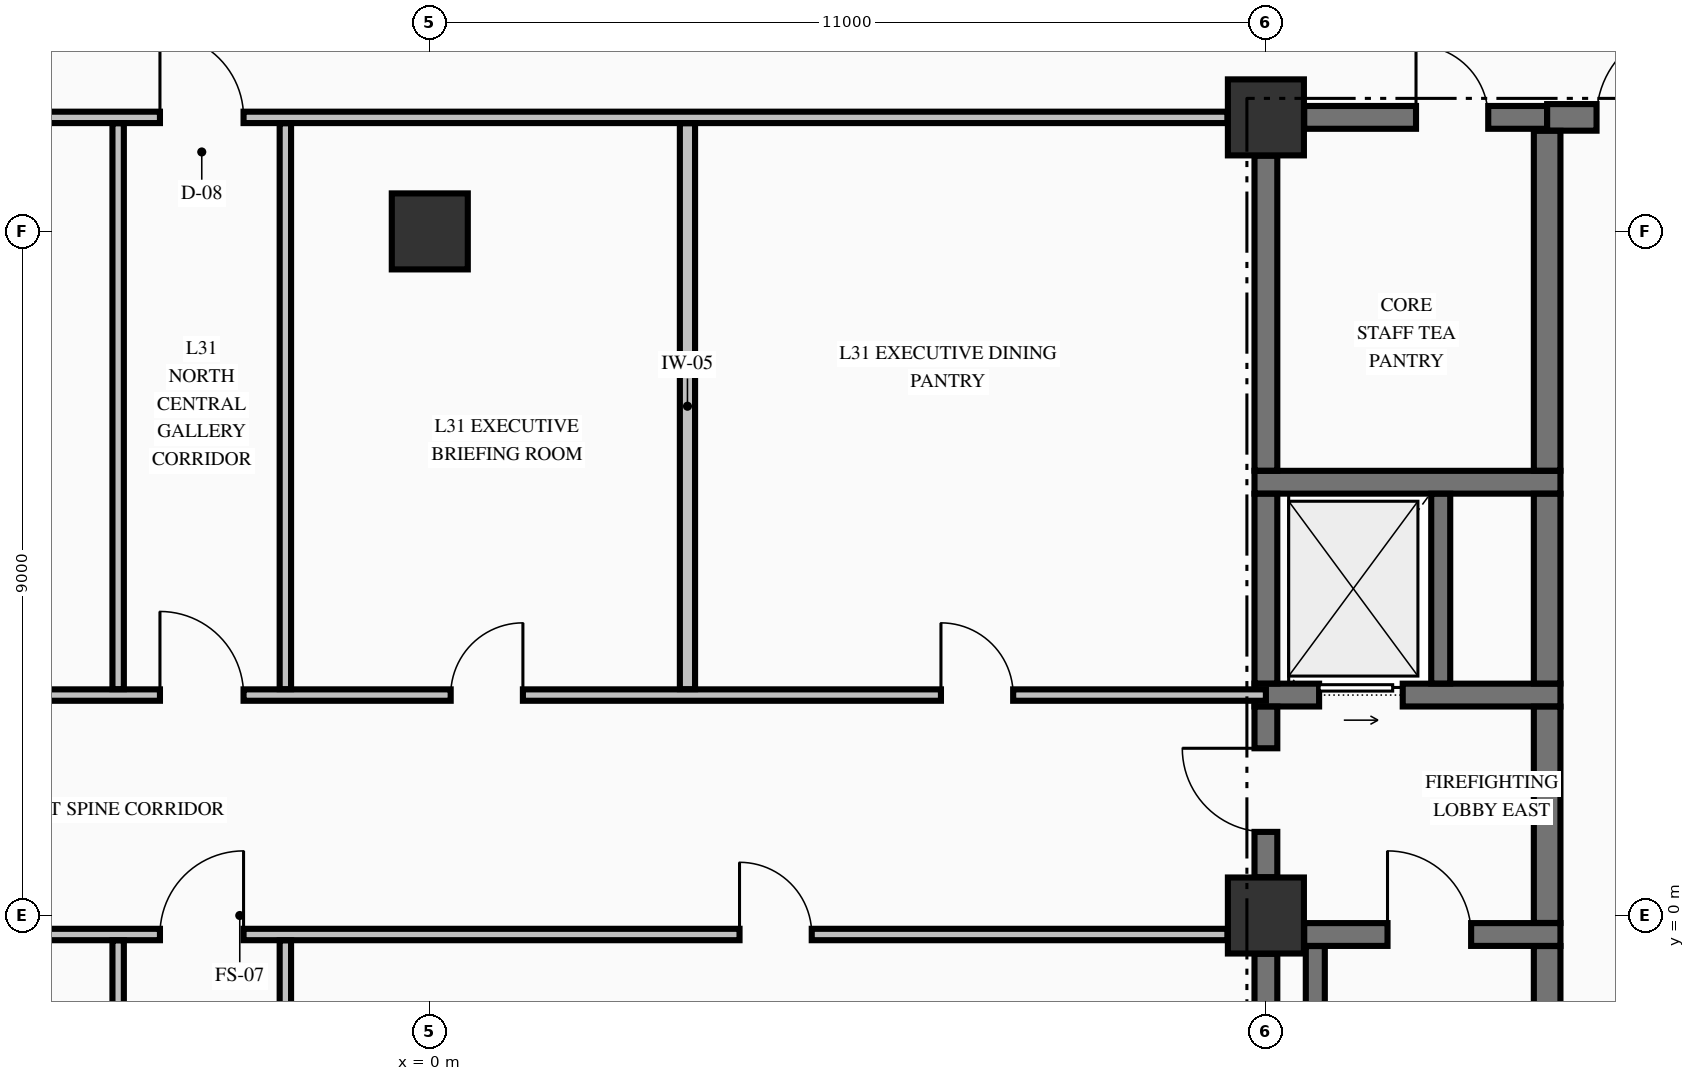
"""IFC4 building model, lengths in metres.
Left out: names, types, materials, properties, quantities, classifications, styles, units other than length and angle.
Written with IfcOpenShell. Run it as: python <this file> out.ifc"""

import sys

from ifc_helpers import new_model, si_unit, direction, frame, frame_2d, origin, origin_2d, place, context, subcontext, project, spatial, rectangle, extrude, element, fill, save


model = new_model("IFC4")
c1 = context("Model", 3, precision=1e-05, world=origin(), true_north=direction((0.0, 1.0)))
c2 = subcontext(c1, "Body", "Model", "MODEL_VIEW")
j1 = project(units=[si_unit("LENGTHUNIT", "METRE"), si_unit("PLANEANGLEUNIT", "RADIAN")], contexts=[c1])
p1 = place(None, origin())
s1 = spatial("IfcSite", under=j1, at=p1, CompositionType="ELEMENT")
p2 = place(p1, origin())
s2 = spatial("IfcBuilding", under=s1, at=p2, CompositionType="ELEMENT")
p3 = place(p2, frame((0.0, 0.0, 124.92)))
s3 = spatial("IfcBuildingStorey", under=s2, at=p3, CompositionType="ELEMENT", Elevation=124.92)
for number, where, z_axis, x_axis in (
    (1, (11.0, 0.0, -0.25), (0.0, 0.0, 1.0), (1.0, 0.0, 0.0)),
    (2, (11.0, 10.5, -0.25), (0.0, 0.0, 1.0), (1.0, 0.0, 0.0)),
    (3, (0.0, 9.0, -0.25), (0.0, 0.0, 1.0), (1.0, 0.0, 0.0)),
):
    element("IfcColumn", number, at=place(p3, frame(where, z_axis=z_axis, x_axis=x_axis)), inside=s3, PredefinedType="COLUMN", context=c2, shape_type="SweptSolid", body=[
        extrude(rectangle(XDim=1.0, YDim=1.0, at=origin_2d()), origin(), (0.0, 0.0, 1.0), 3.57),
    ])
p4 = place(p3, frame((11.504, -0.25, 0.0), z_axis=(0.0, 0.0, 1.0), x_axis=(1.0, 0.0, 0.0)))
e4 = element("IfcWall", 4, at=p4, inside=s3, PredefinedType="SHEAR", context=c2, shape_type="SweptSolid", body=[
    extrude(rectangle(XDim=3.371, YDim=0.3, at=frame_2d((1.686, 0.0))), origin(), (0.0, 0.0, 1.0), 3.32),
])
p5 = place(p4, frame((1.096, 0.0, 0.0)))
e5 = element("IfcOpeningElement", 5, at=p5, cuts=e4, PredefinedType="OPENING", context=c2, shape_type="SweptSolid", body=[
    extrude(rectangle(XDim=1.1, YDim=2.15, at=frame_2d((0.55, 1.075))), frame((0.0, 0.16, 0.0), z_axis=(0.0, -1.0, 0.0), x_axis=(1.0, 0.0, 0.0)), (0.0, 0.0, 1.0), 0.32),
])
p6 = place(p3, frame((10.85, 2.9, 0.0), z_axis=(0.0, 0.0, 1.0), x_axis=(1.0, 0.0, 0.0)))
e6 = element("IfcWall", 6, at=p6, inside=s3, PredefinedType="SHEAR", context=c2, shape_type="SweptSolid", body=[
    extrude(rectangle(XDim=4.025, YDim=0.3, at=frame_2d((2.012, 0.0))), origin(), (0.0, 0.0, 1.0), 3.32),
])
p7 = place(p6, frame((0.85, 0.0, 0.0)))
e7 = element("IfcOpeningElement", 7, at=p7, cuts=e6, PredefinedType="OPENING", context=c2, shape_type="SweptSolid", body=[
    extrude(rectangle(XDim=1.1, YDim=2.2, at=frame_2d((0.55, 1.1))), frame((0.0, 0.16, 0.0), z_axis=(0.0, -1.0, 0.0), x_axis=(1.0, 0.0, 0.0)), (0.0, 0.0, 1.0), 0.32),
])
p8 = place(p3, frame((10.85, 5.7, 0.0), z_axis=(0.0, 0.0, 1.0), x_axis=(1.0, 0.0, 0.0)))
e8 = element("IfcWall", 8, at=p8, inside=s3, PredefinedType="SHEAR", context=c2, shape_type="SweptSolid", body=[
    extrude(rectangle(XDim=4.025, YDim=0.3, at=frame_2d((2.012, 0.0))), origin(), (0.0, 0.0, 1.0), 3.32),
])
p9 = place(p3, frame((11.504, 10.5, 0.0), z_axis=(0.0, 0.0, 1.0), x_axis=(1.0, 0.0, 0.0)))
e9 = element("IfcWall", 9, at=p9, inside=s3, PredefinedType="SHEAR", context=c2, shape_type="SweptSolid", body=[
    extrude(rectangle(XDim=3.196, YDim=0.3, at=frame_2d((1.598, 0.0))), origin(), (0.0, 0.0, 1.0), 3.32),
])
p10 = place(p9, frame((1.471, 0.0, 0.0)))
e10 = element("IfcOpeningElement", 10, at=p10, cuts=e9, PredefinedType="OPENING", context=c2, shape_type="SweptSolid", body=[
    extrude(rectangle(XDim=0.95, YDim=2.15, at=frame_2d((0.475, 1.075))), frame((0.0, 0.16, 0.0), z_axis=(0.0, -1.0, 0.0), x_axis=(1.0, 0.0, 0.0)), (0.0, 0.0, 1.0), 0.32),
])
p11 = place(p3, frame((14.7, 10.5, 0.0), z_axis=(0.0, 0.0, 1.0), x_axis=(1.0, 0.0, 0.0)))
e11 = element("IfcWall", 11, at=p11, inside=s3, PredefinedType="SHEAR", context=c2, shape_type="SweptSolid", body=[
    extrude(rectangle(XDim=4.796, YDim=0.35, at=frame_2d((2.398, 0.0))), origin(), (0.0, 0.0, 1.0), 3.32),
])
p12 = place(p11, frame((0.65, 0.0, 0.0)))
e12 = element("IfcOpeningElement", 12, at=p12, cuts=e11, PredefinedType="OPENING", context=c2, shape_type="SweptSolid", body=[
    extrude(rectangle(XDim=1.2, YDim=2.15, at=frame_2d((0.6, 1.075))), frame((0.0, 0.185, 0.0), z_axis=(0.0, -1.0, 0.0), x_axis=(1.0, 0.0, 0.0)), (0.0, 0.0, 1.0), 0.37),
])
p13 = place(p11, frame((3.225, 0.0, 0.0)))
e13 = element("IfcOpeningElement", 13, at=p13, cuts=e11, PredefinedType="OPENING", context=c2, shape_type="SweptSolid", body=[
    extrude(rectangle(XDim=0.95, YDim=2.15, at=frame_2d((0.475, 1.075))), frame((0.0, 0.185, 0.0), z_axis=(0.0, -1.0, 0.0), x_axis=(1.0, 0.0, 0.0)), (0.0, 0.0, 1.0), 0.37),
])
p14 = place(p3, frame((-10.494, -0.25, 0.0), z_axis=(0.0, 0.0, 1.0), x_axis=(1.0, 0.0, 0.0)))
e14 = element("IfcWall", 14, at=p14, inside=s3, PredefinedType="PARTITIONING", context=c2, shape_type="SweptSolid", body=[
    extrude(rectangle(XDim=20.988, YDim=0.15, at=frame_2d((10.494, 0.0))), origin(), (0.0, 0.0, 1.0), 3.32),
])
p15 = place(p14, frame((6.944, 0.0, 0.0)))
e15 = element("IfcOpeningElement", 15, at=p15, cuts=e14, PredefinedType="OPENING", context=c2, shape_type="SweptSolid", body=[
    extrude(rectangle(XDim=1.1, YDim=2.15, at=frame_2d((0.55, 1.075))), frame((0.0, 0.085, 0.0), z_axis=(0.0, -1.0, 0.0), x_axis=(1.0, 0.0, 0.0)), (0.0, 0.0, 1.0), 0.17),
])
p16 = place(p14, frame((2.419, 0.0, 0.0)))
e16 = element("IfcOpeningElement", 16, at=p16, cuts=e14, PredefinedType="OPENING", context=c2, shape_type="SweptSolid", body=[
    extrude(rectangle(XDim=1.05, YDim=2.15, at=frame_2d((0.525, 1.075))), frame((0.0, 0.085, 0.0), z_axis=(0.0, -1.0, 0.0), x_axis=(1.0, 0.0, 0.0)), (0.0, 0.0, 1.0), 0.17),
])
p17 = place(p14, frame((14.569, 0.0, 0.0)))
e17 = element("IfcOpeningElement", 17, at=p17, cuts=e14, PredefinedType="OPENING", context=c2, shape_type="SweptSolid", body=[
    extrude(rectangle(XDim=0.95, YDim=2.15, at=frame_2d((0.475, 1.075))), frame((0.0, 0.085, 0.0), z_axis=(0.0, -1.0, 0.0), x_axis=(1.0, 0.0, 0.0)), (0.0, 0.0, 1.0), 0.17),
])
p18 = place(p3, frame((-11.0, 2.9, 0.0), z_axis=(0.0, 0.0, 1.0), x_axis=(1.0, 0.0, 0.0)))
e18 = element("IfcWall", 18, at=p18, inside=s3, PredefinedType="PARTITIONING", context=c2, shape_type="SweptSolid", body=[
    extrude(rectangle(XDim=22.0, YDim=0.15, at=frame_2d((11.0, 0.0))), origin(), (0.0, 0.0, 1.0), 3.32),
])
p19 = place(p18, frame((7.45, 0.0, 0.0)))
e19 = element("IfcOpeningElement", 19, at=p19, cuts=e18, PredefinedType="OPENING", context=c2, shape_type="SweptSolid", body=[
    extrude(rectangle(XDim=1.1, YDim=2.15, at=frame_2d((0.55, 1.075))), frame((0.0, 0.085, 0.0), z_axis=(0.0, -1.0, 0.0), x_axis=(1.0, 0.0, 0.0)), (0.0, 0.0, 1.0), 0.17),
])
p20 = place(p18, frame((2.925, 0.0, 0.0)))
e20 = element("IfcOpeningElement", 20, at=p20, cuts=e18, PredefinedType="OPENING", context=c2, shape_type="SweptSolid", body=[
    extrude(rectangle(XDim=1.05, YDim=2.15, at=frame_2d((0.525, 1.075))), frame((0.0, 0.085, 0.0), z_axis=(0.0, -1.0, 0.0), x_axis=(1.0, 0.0, 0.0)), (0.0, 0.0, 1.0), 0.17),
])
p21 = place(p18, frame((11.275, 0.0, 0.0)))
e21 = element("IfcOpeningElement", 21, at=p21, cuts=e18, PredefinedType="OPENING", context=c2, shape_type="SweptSolid", body=[
    extrude(rectangle(XDim=0.95, YDim=2.15, at=frame_2d((0.475, 1.075))), frame((0.0, 0.085, 0.0), z_axis=(0.0, -1.0, 0.0), x_axis=(1.0, 0.0, 0.0)), (0.0, 0.0, 1.0), 0.17),
])
p22 = place(p18, frame((17.725, 0.0, 0.0)))
e22 = element("IfcOpeningElement", 22, at=p22, cuts=e18, PredefinedType="OPENING", context=c2, shape_type="SweptSolid", body=[
    extrude(rectangle(XDim=0.95, YDim=2.15, at=frame_2d((0.475, 1.075))), frame((0.0, 0.085, 0.0), z_axis=(0.0, -1.0, 0.0), x_axis=(1.0, 0.0, 0.0)), (0.0, 0.0, 1.0), 0.17),
])
p23 = place(p3, frame((-10.494, 10.5, 0.0), z_axis=(0.0, 0.0, 1.0), x_axis=(1.0, 0.0, 0.0)))
e23 = element("IfcWall", 23, at=p23, inside=s3, PredefinedType="PARTITIONING", context=c2, shape_type="SweptSolid", body=[
    extrude(rectangle(XDim=20.988, YDim=0.15, at=frame_2d((10.494, 0.0))), origin(), (0.0, 0.0, 1.0), 3.32),
])
p24 = place(p23, frame((6.944, 0.0, 0.0)))
e24 = element("IfcOpeningElement", 24, at=p24, cuts=e23, PredefinedType="OPENING", context=c2, shape_type="SweptSolid", body=[
    extrude(rectangle(XDim=1.1, YDim=2.15, at=frame_2d((0.55, 1.075))), frame((0.0, 0.085, 0.0), z_axis=(0.0, -1.0, 0.0), x_axis=(1.0, 0.0, 0.0)), (0.0, 0.0, 1.0), 0.17),
])
p25 = place(p3, frame((11.0, -9.446, 0.0), z_axis=(0.0, 0.0, 1.0), x_axis=(0.0, 1.0, 0.0)))
e25 = element("IfcWall", 25, at=p25, inside=s3, PredefinedType="SHEAR", context=c2, shape_type="SweptSolid", body=[
    extrude(rectangle(XDim=8.942, YDim=0.3, at=frame_2d((4.471, 0.0))), origin(), (0.0, 0.0, 1.0), 3.32),
])
p26 = place(p3, frame((11.0, 0.504, 0.0), z_axis=(0.0, 0.0, 1.0), x_axis=(0.0, 1.0, 0.0)))
e26 = element("IfcWall", 26, at=p26, inside=s3, PredefinedType="SHEAR", context=c2, shape_type="SweptSolid", body=[
    extrude(rectangle(XDim=2.244, YDim=0.3, at=frame_2d((1.122, 0.0))), origin(), (0.0, 0.0, 1.0), 3.32),
])
p27 = place(p26, frame((0.596, 0.0, 0.0)))
e27 = element("IfcOpeningElement", 27, at=p27, cuts=e26, PredefinedType="OPENING", context=c2, shape_type="SweptSolid", body=[
    extrude(rectangle(XDim=1.1, YDim=2.15, at=frame_2d((0.55, 1.075))), frame((0.0, 0.16, 0.0), z_axis=(0.0, -1.0, 0.0), x_axis=(1.0, 0.0, 0.0)), (0.0, 0.0, 1.0), 0.32),
])
p28 = place(p3, frame((11.0, 3.052, 0.0), z_axis=(0.0, 0.0, 1.0), x_axis=(0.0, 1.0, 0.0)))
e28 = element("IfcWall", 28, at=p28, inside=s3, PredefinedType="SHEAR", context=c2, shape_type="SweptSolid", body=[
    extrude(rectangle(XDim=2.496, YDim=0.3, at=frame_2d((1.248, 0.0))), origin(), (0.0, 0.0, 1.0), 3.32),
])
p29 = place(p3, frame((11.0, 5.852, 0.0), z_axis=(0.0, 0.0, 1.0), x_axis=(0.0, 1.0, 0.0)))
e29 = element("IfcWall", 29, at=p29, inside=s3, PredefinedType="SHEAR", context=c2, shape_type="SweptSolid", body=[
    extrude(rectangle(XDim=4.144, YDim=0.3, at=frame_2d((2.072, 0.0))), origin(), (0.0, 0.0, 1.0), 3.32),
])
p30 = place(p3, frame((11.65, -9.798, 0.0), z_axis=(0.0, 0.0, 1.0), x_axis=(0.0, 1.0, 0.0)))
e30 = element("IfcWall", 30, at=p30, inside=s3, PredefinedType="SOLIDWALL", context=c2, shape_type="SweptSolid", body=[
    extrude(rectangle(XDim=9.396, YDim=0.25, at=frame_2d((4.698, 0.0))), origin(), (0.0, 0.0, 1.0), 3.32),
])
p31 = place(p3, frame((13.3, 3.052, 0.0), z_axis=(0.0, 0.0, 1.0), x_axis=(0.0, 1.0, 0.0)))
e31 = element("IfcWall", 31, at=p31, inside=s3, PredefinedType="SOLIDWALL", context=c2, shape_type="SweptSolid", body=[
    extrude(rectangle(XDim=2.496, YDim=0.25, at=frame_2d((1.248, 0.0))), origin(), (0.0, 0.0, 1.0), 3.32),
])
p32 = place(p3, frame((14.7, -9.773, 0.0), z_axis=(0.0, 0.0, 1.0), x_axis=(0.0, 1.0, 0.0)))
e32 = element("IfcWall", 32, at=p32, inside=s3, PredefinedType="SHEAR", context=c2, shape_type="SweptSolid", body=[
    extrude(rectangle(XDim=9.371, YDim=0.35, at=frame_2d((4.686, 0.0))), origin(), (0.0, 0.0, 1.0), 3.32),
])
p33 = place(p3, frame((14.7, -0.098, 0.0), z_axis=(0.0, 0.0, 1.0), x_axis=(0.0, 1.0, 0.0)))
e33 = element("IfcWall", 33, at=p33, inside=s3, PredefinedType="SHEAR", context=c2, shape_type="SweptSolid", body=[
    extrude(rectangle(XDim=2.846, YDim=0.35, at=frame_2d((1.423, 0.0))), origin(), (0.0, 0.0, 1.0), 3.32),
])
p34 = place(p3, frame((14.7, 3.052, 0.0), z_axis=(0.0, 0.0, 1.0), x_axis=(0.0, 1.0, 0.0)))
e34 = element("IfcWall", 34, at=p34, inside=s3, PredefinedType="SHEAR", context=c2, shape_type="SweptSolid", body=[
    extrude(rectangle(XDim=2.496, YDim=0.35, at=frame_2d((1.248, 0.0))), origin(), (0.0, 0.0, 1.0), 3.32),
])
p35 = place(p3, frame((14.7, 5.852, 0.0), z_axis=(0.0, 0.0, 1.0), x_axis=(0.0, 1.0, 0.0)))
e35 = element("IfcWall", 35, at=p35, inside=s3, PredefinedType="SHEAR", context=c2, shape_type="SweptSolid", body=[
    extrude(rectangle(XDim=4.471, YDim=0.35, at=frame_2d((2.235, 0.0))), origin(), (0.0, 0.0, 1.0), 3.32),
])
p36 = place(p3, frame((-4.1, -9.872, 0.0), z_axis=(0.0, 0.0, 1.0), x_axis=(0.0, 1.0, 0.0)))
e36 = element("IfcWall", 36, at=p36, inside=s3, PredefinedType="PARTITIONING", context=c2, shape_type="SweptSolid", body=[
    extrude(rectangle(XDim=9.544, YDim=0.15, at=frame_2d((4.772, 0.0))), origin(), (0.0, 0.0, 1.0), 3.32),
])
p37 = place(p3, frame((-4.1, 2.978, 0.0), z_axis=(0.0, 0.0, 1.0), x_axis=(0.0, 1.0, 0.0)))
e37 = element("IfcWall", 37, at=p37, inside=s3, PredefinedType="PARTITIONING", context=c2, shape_type="SweptSolid", body=[
    extrude(rectangle(XDim=7.444, YDim=0.15, at=frame_2d((3.722, 0.0))), origin(), (0.0, 0.0, 1.0), 3.32),
])
p38 = place(p3, frame((-1.9, -4.747, 0.0), z_axis=(0.0, 0.0, 1.0), x_axis=(0.0, 1.0, 0.0)))
e38 = element("IfcWall", 38, at=p38, inside=s3, PredefinedType="PARTITIONING", context=c2, shape_type="SweptSolid", body=[
    extrude(rectangle(XDim=4.419, YDim=0.15, at=frame_2d((2.209, 0.0))), origin(), (0.0, 0.0, 1.0), 3.32),
])
p39 = place(p3, frame((-1.9, 2.978, 0.0), z_axis=(0.0, 0.0, 1.0), x_axis=(0.0, 1.0, 0.0)))
e39 = element("IfcWall", 39, at=p39, inside=s3, PredefinedType="PARTITIONING", context=c2, shape_type="SweptSolid", body=[
    extrude(rectangle(XDim=7.444, YDim=0.15, at=frame_2d((3.722, 0.0))), origin(), (0.0, 0.0, 1.0), 3.32),
])
p40 = place(p3, frame((3.39, 2.978, 0.0), z_axis=(0.0, 0.0, 1.0), x_axis=(0.0, 1.0, 0.0)))
e40 = element("IfcWall", 40, at=p40, inside=s3, PredefinedType="PARTITIONING", context=c2, shape_type="SweptSolid", body=[
    extrude(rectangle(XDim=7.444, YDim=0.2, at=frame_2d((3.722, 0.0))), origin(), (0.0, 0.0, 1.0), 3.32),
])
p41 = place(p5, origin())
e41 = element("IfcDoor", 41, at=p41, inside=s3, OperationType="SINGLE_SWING_LEFT", PredefinedType="DOOR", context=c2, shape_type="SweptSolid", body=[
    extrude(rectangle(XDim=1.1, YDim=2.15, at=frame_2d((0.55, 1.075))), frame((0.0, 0.025, 0.0), z_axis=(0.0, -1.0, 0.0), x_axis=(1.0, 0.0, 0.0)), (0.0, 0.0, 1.0), 0.05),
])
fill(e5, e41)
p42 = place(p27, origin())
e42 = element("IfcDoor", 42, at=p42, inside=s3, OperationType="SINGLE_SWING_RIGHT", PredefinedType="DOOR", context=c2, shape_type="SweptSolid", body=[
    extrude(rectangle(XDim=1.1, YDim=2.15, at=frame_2d((0.55, 1.075))), frame((0.0, 0.025, 0.0), z_axis=(0.0, -1.0, 0.0), x_axis=(1.0, 0.0, 0.0)), (0.0, 0.0, 1.0), 0.05),
])
fill(e27, e42)
p43 = place(p7, origin())
e43 = element("IfcDoor", 43, at=p43, inside=s3, OperationType="SLIDING_TO_RIGHT", PredefinedType="DOOR", context=c2, shape_type="SweptSolid", body=[
    extrude(rectangle(XDim=1.1, YDim=2.2, at=frame_2d((0.55, 1.1))), frame((0.0, 0.025, 0.0), z_axis=(0.0, -1.0, 0.0), x_axis=(1.0, 0.0, 0.0)), (0.0, 0.0, 1.0), 0.05),
])
fill(e7, e43)
p44 = place(p10, origin())
e44 = element("IfcDoor", 44, at=p44, inside=s3, OperationType="SINGLE_SWING_LEFT", PredefinedType="DOOR", context=c2, shape_type="SweptSolid", body=[
    extrude(rectangle(XDim=0.95, YDim=2.15, at=frame_2d((0.475, 1.075))), frame((0.0, 0.025, 0.0), z_axis=(0.0, -1.0, 0.0), x_axis=(1.0, 0.0, 0.0)), (0.0, 0.0, 1.0), 0.05),
])
fill(e10, e44)
p45 = place(p12, origin())
e45 = element("IfcDoor", 45, at=p45, inside=s3, OperationType="SINGLE_SWING_RIGHT", PredefinedType="DOOR", context=c2, shape_type="SweptSolid", body=[
    extrude(rectangle(XDim=1.2, YDim=2.15, at=frame_2d((0.6, 1.075))), frame((0.0, 0.025, 0.0), z_axis=(0.0, -1.0, 0.0), x_axis=(1.0, 0.0, 0.0)), (0.0, 0.0, 1.0), 0.05),
])
fill(e12, e45)
p46 = place(p24, origin())
e46 = element("IfcDoor", 46, at=p46, inside=s3, OperationType="SINGLE_SWING_LEFT", PredefinedType="DOOR", context=c2, shape_type="SweptSolid", body=[
    extrude(rectangle(XDim=1.1, YDim=2.15, at=frame_2d((0.55, 1.075))), frame((0.0, 0.025, 0.0), z_axis=(0.0, -1.0, 0.0), x_axis=(1.0, 0.0, 0.0)), (0.0, 0.0, 1.0), 0.05),
])
fill(e24, e46)
p47 = place(p19, origin())
e47 = element("IfcDoor", 47, at=p47, inside=s3, OperationType="SINGLE_SWING_LEFT", PredefinedType="DOOR", context=c2, shape_type="SweptSolid", body=[
    extrude(rectangle(XDim=1.1, YDim=2.15, at=frame_2d((0.55, 1.075))), frame((0.0, 0.025, 0.0), z_axis=(0.0, -1.0, 0.0), x_axis=(1.0, 0.0, 0.0)), (0.0, 0.0, 1.0), 0.05),
])
fill(e19, e47)
p48 = place(p15, origin())
e48 = element("IfcDoor", 48, at=p48, inside=s3, OperationType="SINGLE_SWING_RIGHT", PredefinedType="DOOR", context=c2, shape_type="SweptSolid", body=[
    extrude(rectangle(XDim=1.1, YDim=2.15, at=frame_2d((0.55, 1.075))), frame((0.0, 0.025, 0.0), z_axis=(0.0, -1.0, 0.0), x_axis=(1.0, 0.0, 0.0)), (0.0, 0.0, 1.0), 0.05),
])
fill(e15, e48)
p49 = place(p21, origin())
e49 = element("IfcDoor", 49, at=p49, inside=s3, OperationType="SINGLE_SWING_RIGHT", PredefinedType="DOOR", context=c2, shape_type="SweptSolid", body=[
    extrude(rectangle(XDim=0.95, YDim=2.15, at=frame_2d((0.475, 1.075))), frame((0.0, 0.025, 0.0), z_axis=(0.0, -1.0, 0.0), x_axis=(1.0, 0.0, 0.0)), (0.0, 0.0, 1.0), 0.05),
])
fill(e21, e49)
p50 = place(p22, origin())
e50 = element("IfcDoor", 50, at=p50, inside=s3, OperationType="SINGLE_SWING_LEFT", PredefinedType="DOOR", context=c2, shape_type="SweptSolid", body=[
    extrude(rectangle(XDim=0.95, YDim=2.15, at=frame_2d((0.475, 1.075))), frame((0.0, 0.025, 0.0), z_axis=(0.0, -1.0, 0.0), x_axis=(1.0, 0.0, 0.0)), (0.0, 0.0, 1.0), 0.05),
])
fill(e22, e50)
p51 = place(p17, origin())
e51 = element("IfcDoor", 51, at=p51, inside=s3, OperationType="SINGLE_SWING_LEFT", PredefinedType="DOOR", context=c2, shape_type="SweptSolid", body=[
    extrude(rectangle(XDim=0.95, YDim=2.15, at=frame_2d((0.475, 1.075))), frame((0.0, 0.025, 0.0), z_axis=(0.0, -1.0, 0.0), x_axis=(1.0, 0.0, 0.0)), (0.0, 0.0, 1.0), 0.05),
])
fill(e17, e51)
save(model, sys.argv[1])
